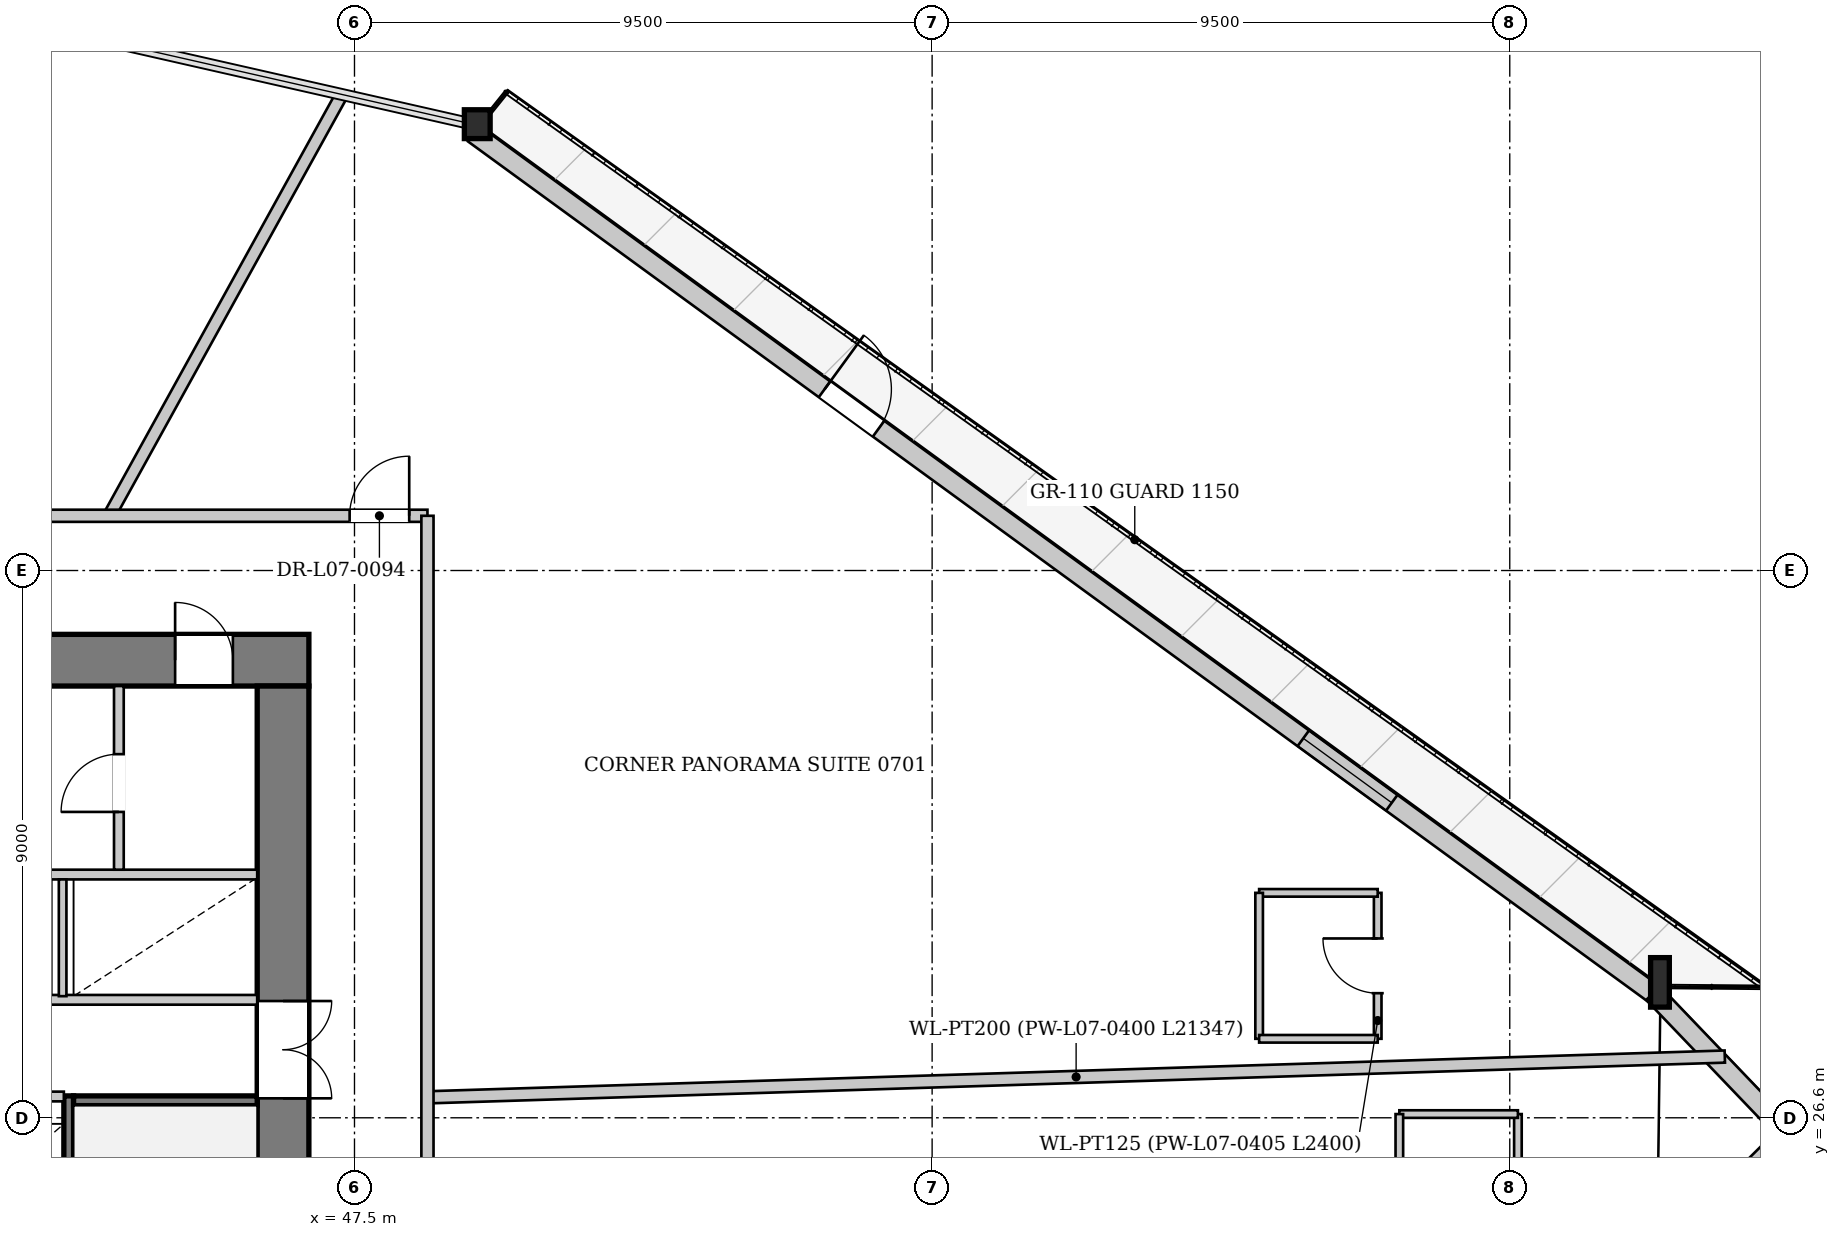
"""IFC4 building model, lengths in metres.
Left out: names, types, materials, properties, quantities, classifications, styles, units other than length and angle.
Written with IfcOpenShell. Run it as: python <this file> out.ifc"""

import sys

from ifc_helpers import new_model, si_unit, direction, frame, frame_2d, origin, origin_2d, place, context, subcontext, project, spatial, rectangle, i_section, extrude, source, transform, mapped, element, fill, save


model = new_model("IFC4")
c1 = context("Model", 3, precision=1e-05, world=origin(), true_north=direction((0.0, 1.0)))
c2 = subcontext(c1, "Body", "Model", "MODEL_VIEW")
j1 = project(units=[si_unit("LENGTHUNIT", "METRE"), si_unit("PLANEANGLEUNIT", "RADIAN")], contexts=[c1])
p1 = place(None, origin())
s1 = spatial("IfcSite", under=j1, at=p1, CompositionType="ELEMENT")
p2 = place(p1, origin())
s2 = spatial("IfcBuilding", under=s1, at=p2, CompositionType="ELEMENT")
p3 = place(p2, frame((0.0, 0.0, 32.85)))
s3 = spatial("IfcBuildingStorey", under=s2, at=p3, CompositionType="ELEMENT", Elevation=32.85)
m1 = source(origin(), c2, "Body", "SweptSolid", [
    extrude(i_section(OverallWidth=0.308, OverallDepth=0.814, WebThickness=0.021, FlangeThickness=0.04, at=origin_2d()), origin(), (0.0, 0.0, 1.0), 3.388),
])
p4 = place(p3, frame((68.975, 28.759, 0.0), z_axis=(-0.00288265822, 0.039852749888, 0.999201405427), x_axis=(-0.99739420877, -0.072144246566, 0.0)))
e1 = element("IfcColumn", 1, at=p4, inside=s3, PredefinedType="COLUMN", context=c2, shape_type="MappedRepresentation", body=[
    mapped(m1, transform((0.0, 0.0, 0.0), x_axis=(1.0, 0.0, 0.0), y_axis=(0.0, 1.0, 0.0), z_axis=(0.0, 0.0, 1.0), scale=1.0)),
])
m2 = source(origin(), c2, "Body", "SweptSolid", [
    extrude(i_section(OverallWidth=0.424, OverallDepth=0.474, WebThickness=0.043, FlangeThickness=0.068, at=origin_2d()), origin(), (0.0, 0.0, 1.0), 3.386),
])
p5 = place(p3, frame((49.555, 42.915, 0.0), z_axis=(-0.021053232125, 0.014852622664, 0.999668025405), x_axis=(-0.576463443595, -0.817122939464, 0.0)))
e2 = element("IfcColumn", 2, at=p5, inside=s3, PredefinedType="COLUMN", context=c2, shape_type="MappedRepresentation", body=[
    mapped(m2, transform((0.0, 0.0, 0.0), x_axis=(1.0, 0.0, 0.0), y_axis=(0.0, 1.0, 0.0), z_axis=(0.0, 0.0, 1.0), scale=1.0)),
])
p6 = place(p3, frame((49.46, 42.786, 0.0), z_axis=(0.0, 0.0, 1.0), x_axis=(0.808105654282, -0.589037563757, 0.0)))
e3 = element("IfcWall", 3, at=p6, inside=s3, PredefinedType="SOLIDWALL", context=c2, shape_type="SweptSolid", body=[
    extrude(rectangle(XDim=24.032, YDim=0.32, at=frame_2d((12.016, 0.0))), origin(), (0.0, 0.0, 1.0), 2.592),
])
p7 = place(p6, frame((7.14, 0.0, 0.0)))
e4 = element("IfcOpeningElement", 4, at=p7, cuts=e3, PredefinedType="OPENING", context=c2, shape_type="SweptSolid", body=[
    extrude(rectangle(XDim=1.1, YDim=2.3, at=frame_2d((0.55, 1.15))), frame((0.0, 0.17, 0.0), z_axis=(0.0, -1.0, 0.0), x_axis=(1.0, 0.0, 0.0)), (0.0, 0.0, 1.0), 0.34),
])
p8 = place(p6, frame((16.884, 0.0, 0.272)))
e5 = element("IfcOpeningElement", 5, at=p8, cuts=e3, PredefinedType="OPENING", context=c2, shape_type="SweptSolid", body=[
    extrude(rectangle(XDim=1.8, YDim=2.2, at=frame_2d((0.9, 1.1))), frame((0.0, 0.17, 0.0), z_axis=(0.0, -1.0, 0.0), x_axis=(1.0, 0.0, 0.0)), (0.0, 0.0, 1.0), 0.34),
])
for number, where, z_axis, x_axis in (
    (6, (68.859, 28.649, 0.0), (0.0, 0.0, 1.0), (0.691, -0.722, 0.0)),
    (7, (71.181, 26.45, 0.0), (0.0, 0.0, 1.0), (-0.71, -0.704, 0.0)),
):
    element("IfcWall", number, at=place(p3, frame(where, z_axis=z_axis, x_axis=x_axis)), inside=s3, PredefinedType="SOLIDWALL", context=c2, shape_type="SweptSolid", body=[
        extrude(rectangle(XDim=3.354, YDim=0.32, at=frame_2d((1.677, 0.0))), origin(), (0.0, 0.0, 1.0), 2.592),
    ])
p9 = place(p3, frame((29.25, 34.125, 0.0), z_axis=(0.0, 0.0, 1.0), x_axis=(1.0, 0.0, 0.0)))
e8 = element("IfcWall", 8, at=p9, inside=s3, PredefinedType="SHEAR", context=c2, shape_type="SweptSolid", body=[
    extrude(rectangle(XDim=17.5, YDim=0.85, at=frame_2d((8.75, 0.0))), origin(), (0.0, 0.0, 1.0), 3.3),
])
p10 = place(p9, frame((1.85, 0.0, 0.0)))
e9 = element("IfcOpeningElement", 9, at=p10, cuts=e8, PredefinedType="OPENING", context=c2, shape_type="SweptSolid", body=[
    extrude(rectangle(XDim=0.95, YDim=2.1, at=frame_2d((0.475, 1.05))), frame((0.0, 0.435, 0.0), z_axis=(0.0, -1.0, 0.0), x_axis=(1.0, 0.0, 0.0)), (0.0, 0.0, 1.0), 0.87),
])
p11 = place(p9, frame((4.23, 0.0, 0.0)))
e10 = element("IfcOpeningElement", 10, at=p11, cuts=e8, PredefinedType="OPENING", context=c2, shape_type="SweptSolid", body=[
    extrude(rectangle(XDim=1.32, YDim=2.2, at=frame_2d((0.66, 1.1))), frame((0.0, 0.435, 0.0), z_axis=(0.0, -1.0, 0.0), x_axis=(1.0, 0.0, 0.0)), (0.0, 0.0, 1.0), 0.87),
])
p12 = place(p9, frame((15.3, 0.0, 0.0)))
e11 = element("IfcOpeningElement", 11, at=p12, cuts=e8, PredefinedType="OPENING", context=c2, shape_type="SweptSolid", body=[
    extrude(rectangle(XDim=0.95, YDim=2.1, at=frame_2d((0.475, 1.05))), frame((0.0, 0.435, 0.0), z_axis=(0.0, -1.0, 0.0), x_axis=(1.0, 0.0, 0.0)), (0.0, 0.0, 1.0), 0.87),
])
p13 = place(p3, frame((46.325, 33.7, 0.0), z_axis=(0.0, 0.0, 1.0), x_axis=(0.0, -1.0, 0.0)))
e12 = element("IfcWall", 12, at=p13, inside=s3, PredefinedType="SHEAR", context=c2, shape_type="SweptSolid", body=[
    extrude(rectangle(XDim=14.2, YDim=0.85, at=frame_2d((7.1, 0.0))), origin(), (0.0, 0.0, 1.0), 3.3),
])
p14 = place(p13, frame((5.18, 0.0, 0.0)))
e13 = element("IfcOpeningElement", 13, at=p14, cuts=e12, PredefinedType="OPENING", context=c2, shape_type="SweptSolid", body=[
    extrude(rectangle(XDim=1.6, YDim=2.2, at=frame_2d((0.8, 1.1))), frame((0.0, 0.435, 0.0), z_axis=(0.0, -1.0, 0.0), x_axis=(1.0, 0.0, 0.0)), (0.0, 0.0, 1.0), 0.87),
])
p15 = place(p3, frame((42.8, 26.96, 0.0), z_axis=(0.0, 0.0, 1.0), x_axis=(0.0, -1.0, 0.0)))
e14 = element("IfcWall", 14, at=p15, inside=s3, PredefinedType="PARTITIONING", context=c2, shape_type="SweptSolid", body=[
    extrude(rectangle(XDim=7.46, YDim=0.16, at=frame_2d((3.73, 0.0))), origin(), (0.0, 0.0, 1.0), 3.3),
])
p16 = place(p15, frame((6.06, 0.0, 0.0)))
e15 = element("IfcOpeningElement", 15, at=p16, cuts=e14, PredefinedType="OPENING", context=c2, shape_type="SweptSolid", body=[
    extrude(rectangle(XDim=1.32, YDim=2.2, at=frame_2d((0.66, 1.1))), frame((0.0, 0.09, 0.0), z_axis=(0.0, -1.0, 0.0), x_axis=(1.0, 0.0, 0.0)), (0.0, 0.0, 1.0), 0.18),
])
p17 = place(p3, frame((42.88, 26.88, 0.0), z_axis=(0.0, 0.0, 1.0), x_axis=(1.0, 0.0, 0.0)))
e16 = element("IfcWall", 16, at=p17, inside=s3, PredefinedType="PARTITIONING", context=c2, shape_type="SweptSolid", body=[
    extrude(rectangle(XDim=3.02, YDim=0.16, at=frame_2d((1.51, 0.0))), origin(), (0.0, 0.0, 1.0), 3.3),
])
p18 = place(p3, frame((33.28, 26.95, 0.0), z_axis=(0.0, 0.0, 1.0), x_axis=(1.0, 0.0, 0.0)))
e17 = element("IfcWall", 17, at=p18, inside=s3, PredefinedType="PARTITIONING", context=c2, shape_type="SweptSolid", body=[
    extrude(rectangle(XDim=9.44, YDim=0.16, at=frame_2d((4.72, 0.0))), origin(), (0.0, 0.0, 1.0), 3.3),
])
p19 = place(p18, frame((0.26, 0.0, 0.0)))
e18 = element("IfcOpeningElement", 18, at=p19, cuts=e17, PredefinedType="OPENING", context=c2, shape_type="SweptSolid", body=[
    extrude(rectangle(XDim=1.1, YDim=2.2, at=frame_2d((0.55, 1.1))), frame((0.0, 0.09, 0.0), z_axis=(0.0, -1.0, 0.0), x_axis=(1.0, 0.0, 0.0)), (0.0, 0.0, 1.0), 0.18),
])
p20 = place(p18, frame((2.01, 0.0, 0.0)))
e19 = element("IfcOpeningElement", 19, at=p20, cuts=e17, PredefinedType="OPENING", context=c2, shape_type="SweptSolid", body=[
    extrude(rectangle(XDim=1.1, YDim=2.2, at=frame_2d((0.55, 1.1))), frame((0.0, 0.09, 0.0), z_axis=(0.0, -1.0, 0.0), x_axis=(1.0, 0.0, 0.0)), (0.0, 0.0, 1.0), 0.18),
])
p21 = place(p18, frame((3.76, 0.0, 0.0)))
e20 = element("IfcOpeningElement", 20, at=p21, cuts=e17, PredefinedType="OPENING", context=c2, shape_type="SweptSolid", body=[
    extrude(rectangle(XDim=1.1, YDim=2.2, at=frame_2d((0.55, 1.1))), frame((0.0, 0.09, 0.0), z_axis=(0.0, -1.0, 0.0), x_axis=(1.0, 0.0, 0.0)), (0.0, 0.0, 1.0), 0.18),
])
p22 = place(p18, frame((5.51, 0.0, 0.0)))
e21 = element("IfcOpeningElement", 21, at=p22, cuts=e17, PredefinedType="OPENING", context=c2, shape_type="SweptSolid", body=[
    extrude(rectangle(XDim=1.1, YDim=2.2, at=frame_2d((0.55, 1.1))), frame((0.0, 0.09, 0.0), z_axis=(0.0, -1.0, 0.0), x_axis=(1.0, 0.0, 0.0)), (0.0, 0.0, 1.0), 0.18),
])
p23 = place(p3, frame((33.28, 28.54, 0.0), z_axis=(0.0, 0.0, 1.0), x_axis=(1.0, 0.0, 0.0)))
e22 = element("IfcWall", 22, at=p23, inside=s3, PredefinedType="PARTITIONING", context=c2, shape_type="SweptSolid", body=[
    extrude(rectangle(XDim=12.62, YDim=0.16, at=frame_2d((6.31, 0.0))), origin(), (0.0, 0.0, 1.0), 3.3),
])
p24 = place(p3, frame((40.72, 30.6, 0.0), z_axis=(0.0, 0.0, 1.0), x_axis=(1.0, 0.0, 0.0)))
e23 = element("IfcWall", 23, at=p24, inside=s3, PredefinedType="PARTITIONING", context=c2, shape_type="SweptSolid", body=[
    extrude(rectangle(XDim=5.18, YDim=0.16, at=frame_2d((2.59, 0.0))), origin(), (0.0, 0.0, 1.0), 3.3),
])
p25 = place(p3, frame((42.7, 28.6, 0.0), z_axis=(0.0, 0.0, 1.0), x_axis=(0.0, 1.0, 0.0)))
e24 = element("IfcWall", 24, at=p25, inside=s3, PredefinedType="PARTITIONING", context=c2, shape_type="SweptSolid", body=[
    extrude(rectangle(XDim=1.92, YDim=0.125, at=frame_2d((0.96, 0.0))), origin(), (0.0, 0.0, 1.0), 3.3),
])
p26 = place(p3, frame((43.625, 30.68, 0.0), z_axis=(0.0, 0.0, 1.0), x_axis=(0.0, 1.0, 0.0)))
e25 = element("IfcWall", 25, at=p26, inside=s3, PredefinedType="PARTITIONING", context=c2, shape_type="SweptSolid", body=[
    extrude(rectangle(XDim=3.02, YDim=0.16, at=frame_2d((1.51, 0.0))), origin(), (0.0, 0.0, 1.0), 3.3),
])
p27 = place(p26, frame((0.95, 0.0, 0.0)))
e26 = element("IfcOpeningElement", 26, at=p27, cuts=e25, PredefinedType="OPENING", context=c2, shape_type="SweptSolid", body=[
    extrude(rectangle(XDim=0.95, YDim=2.1, at=frame_2d((0.475, 1.05))), frame((0.0, 0.09, 0.0), z_axis=(0.0, -1.0, 0.0), x_axis=(1.0, 0.0, 0.0)), (0.0, 0.0, 1.0), 0.18),
])
p28 = place(p3, frame((48.7, 26.936, 0.0), z_axis=(0.0, 0.0, 1.0), x_axis=(0.999506728067, 0.031405422286, 0.0)))
e27 = element("IfcWall", 27, at=p28, inside=s3, PredefinedType="PARTITIONING", context=c2, shape_type="SweptSolid", body=[
    extrude(rectangle(XDim=21.347, YDim=0.2, at=frame_2d((10.673, 0.0))), origin(), (0.0, 0.0, 1.0), 3.3),
])
p29 = place(p3, frame((43.466, 36.5, 0.0), z_axis=(0.0, 0.0, 1.0), x_axis=(0.483393303681, 0.875403286467, 0.0)))
e28 = element("IfcWall", 28, at=p29, inside=s3, PredefinedType="PARTITIONING", context=c2, shape_type="SweptSolid", body=[
    extrude(rectangle(XDim=7.884, YDim=0.2, at=frame_2d((3.942, 0.0))), origin(), (0.0, 0.0, 1.0), 3.3),
])
p30 = place(p3, frame((64.328, 27.899, 0.0), z_axis=(0.0, 0.0, 1.0), x_axis=(0.0, 1.0, 0.0)))
e29 = element("IfcWall", 29, at=p30, inside=s3, PredefinedType="PARTITIONING", context=c2, shape_type="SweptSolid", body=[
    extrude(rectangle(XDim=2.4, YDim=0.125, at=frame_2d((1.2, 0.0))), origin(), (0.0, 0.0, 1.0), 3.3),
])
p31 = place(p30, frame((0.75, 0.0, 0.0)))
e30 = element("IfcOpeningElement", 30, at=p31, cuts=e29, PredefinedType="OPENING", context=c2, shape_type="SweptSolid", body=[
    extrude(rectangle(XDim=0.9, YDim=2.1, at=frame_2d((0.45, 1.05))), frame((0.0, 0.073, 0.0), z_axis=(0.0, -1.0, 0.0), x_axis=(1.0, 0.0, 0.0)), (0.0, 0.0, 1.0), 0.145),
])
p32 = place(p3, frame((64.328, 30.299, 0.0), z_axis=(0.0, 0.0, 1.0), x_axis=(-1.0, 0.0, 0.0)))
e31 = element("IfcWall", 31, at=p32, inside=s3, PredefinedType="PARTITIONING", context=c2, shape_type="SweptSolid", body=[
    extrude(rectangle(XDim=1.95, YDim=0.125, at=frame_2d((0.975, 0.0))), origin(), (0.0, 0.0, 1.0), 3.3),
])
p33 = place(p3, frame((62.378, 30.299, 0.0), z_axis=(0.0, 0.0, 1.0), x_axis=(0.0, -1.0, 0.0)))
e32 = element("IfcWall", 32, at=p33, inside=s3, PredefinedType="PARTITIONING", context=c2, shape_type="SweptSolid", body=[
    extrude(rectangle(XDim=2.4, YDim=0.125, at=frame_2d((1.2, 0.0))), origin(), (0.0, 0.0, 1.0), 3.3),
])
p34 = place(p3, frame((62.378, 27.899, 0.0), z_axis=(0.0, 0.0, 1.0), x_axis=(1.0, 0.0, 0.0)))
e33 = element("IfcWall", 33, at=p34, inside=s3, PredefinedType="PARTITIONING", context=c2, shape_type="SweptSolid", body=[
    extrude(rectangle(XDim=1.95, YDim=0.125, at=frame_2d((0.975, 0.0))), origin(), (0.0, 0.0, 1.0), 3.3),
])
p35 = place(p3, frame((66.634, 24.261, 0.0), z_axis=(0.0, 0.0, 1.0), x_axis=(0.0, 1.0, 0.0)))
e34 = element("IfcWall", 34, at=p35, inside=s3, PredefinedType="PARTITIONING", context=c2, shape_type="SweptSolid", body=[
    extrude(rectangle(XDim=2.4, YDim=0.125, at=frame_2d((1.2, 0.0))), origin(), (0.0, 0.0, 1.0), 3.3),
])
p36 = place(p35, frame((0.75, 0.0, 0.0)))
e35 = element("IfcOpeningElement", 35, at=p36, cuts=e34, PredefinedType="OPENING", context=c2, shape_type="SweptSolid", body=[
    extrude(rectangle(XDim=0.9, YDim=2.1, at=frame_2d((0.45, 1.05))), frame((0.0, 0.073, 0.0), z_axis=(0.0, -1.0, 0.0), x_axis=(1.0, 0.0, 0.0)), (0.0, 0.0, 1.0), 0.145),
])
p37 = place(p3, frame((66.634, 26.661, 0.0), z_axis=(0.0, 0.0, 1.0), x_axis=(-1.0, 0.0, 0.0)))
e36 = element("IfcWall", 36, at=p37, inside=s3, PredefinedType="PARTITIONING", context=c2, shape_type="SweptSolid", body=[
    extrude(rectangle(XDim=1.95, YDim=0.125, at=frame_2d((0.975, 0.0))), origin(), (0.0, 0.0, 1.0), 2.795),
])
p38 = place(p3, frame((64.684, 26.661, 0.0), z_axis=(0.0, 0.0, 1.0), x_axis=(0.0, -1.0, 0.0)))
e37 = element("IfcWall", 37, at=p38, inside=s3, PredefinedType="PARTITIONING", context=c2, shape_type="SweptSolid", body=[
    extrude(rectangle(XDim=2.4, YDim=0.125, at=frame_2d((1.2, 0.0))), origin(), (0.0, 0.0, 1.0), 3.3),
])
p39 = place(p3, frame((27.3, 36.5, 0.0), z_axis=(0.0, 0.0, 1.0), x_axis=(1.0, 0.0, 0.0)))
e38 = element("IfcWall", 38, at=p39, inside=s3, PredefinedType="PARTITIONING", context=c2, shape_type="SweptSolid", body=[
    extrude(rectangle(XDim=21.4, YDim=0.2, at=frame_2d((10.7, 0.0))), origin(), (0.0, 0.0, 1.0), 3.3),
])
p40 = place(p39, frame((20.12, 0.0, 0.0)))
e39 = element("IfcOpeningElement", 39, at=p40, cuts=e38, PredefinedType="OPENING", context=c2, shape_type="SweptSolid", body=[
    extrude(rectangle(XDim=0.98, YDim=2.15, at=frame_2d((0.49, 1.075))), frame((0.0, 0.11, 0.0), z_axis=(0.0, -1.0, 0.0), x_axis=(1.0, 0.0, 0.0)), (0.0, 0.0, 1.0), 0.22),
])
p41 = place(p3, frame((48.7, 16.7, 0.0), z_axis=(0.0, 0.0, 1.0), x_axis=(0.0, 1.0, 0.0)))
e40 = element("IfcWall", 40, at=p41, inside=s3, PredefinedType="PARTITIONING", context=c2, shape_type="SweptSolid", body=[
    extrude(rectangle(XDim=19.8, YDim=0.2, at=frame_2d((9.9, 0.0))), origin(), (0.0, 0.0, 1.0), 3.3),
])
p42 = place(p41, frame((4.231, 0.0, 0.0)))
e41 = element("IfcOpeningElement", 41, at=p42, cuts=e40, PredefinedType="OPENING", context=c2, shape_type="SweptSolid", body=[
    extrude(rectangle(XDim=0.98, YDim=2.15, at=frame_2d((0.49, 1.075))), frame((0.0, 0.11, 0.0), z_axis=(0.0, -1.0, 0.0), x_axis=(1.0, 0.0, 0.0)), (0.0, 0.0, 1.0), 0.22),
])
m3 = source(origin(), c2, "Body", "SweptSolid", [
    extrude(rectangle(XDim=1.1, YDim=2.3, at=frame_2d((0.55, 1.15))), frame((0.0, 0.025, 0.0), z_axis=(0.0, -1.0, 0.0), x_axis=(1.0, 0.0, 0.0)), (0.0, 0.0, 1.0), 0.05),
])
p43 = place(p7, origin())
e42 = element("IfcDoor", 42, at=p43, inside=s3, OperationType="SINGLE_SWING_LEFT", PredefinedType="DOOR", context=c2, shape_type="MappedRepresentation", body=[
    mapped(m3, transform((0.0, 0.0, 0.0), x_axis=(1.0, 0.0, 0.0), y_axis=(0.0, 1.0, 0.0), z_axis=(0.0, 0.0, 1.0), scale=1.0)),
])
fill(e4, e42)
m4 = source(origin(), c2, "Body", "SweptSolid", [
    extrude(rectangle(XDim=1.8, YDim=2.2, at=frame_2d((0.9, 1.1))), frame((0.0, 0.03, 0.0), z_axis=(0.0, -1.0, 0.0), x_axis=(1.0, 0.0, 0.0)), (0.0, 0.0, 1.0), 0.06),
])
p44 = place(p8, origin())
e43 = element("IfcWindow", 43, at=p44, inside=s3, PartitioningType="SINGLE_PANEL", PredefinedType="WINDOW", context=c2, shape_type="MappedRepresentation", body=[
    mapped(m4, transform((0.0, 0.0, 0.0), x_axis=(1.0, 0.0, 0.0), y_axis=(0.0, 1.0, 0.0), z_axis=(0.0, 0.0, 1.0), scale=1.0)),
])
fill(e5, e43)
m5 = source(origin(), c2, "Body", "SweptSolid", [
    extrude(rectangle(XDim=1.6, YDim=2.2, at=frame_2d((0.8, 1.1))), frame((0.0, 0.025, 0.0), z_axis=(0.0, -1.0, 0.0), x_axis=(1.0, 0.0, 0.0)), (0.0, 0.0, 1.0), 0.05),
])
p45 = place(p14, origin())
e44 = element("IfcDoor", 44, at=p45, inside=s3, OperationType="DOUBLE_DOOR_SINGLE_SWING", PredefinedType="DOOR", context=c2, shape_type="MappedRepresentation", body=[
    mapped(m5, transform((0.0, 0.0, 0.0), x_axis=(1.0, 0.0, 0.0), y_axis=(0.0, 1.0, 0.0), z_axis=(0.0, 0.0, 1.0), scale=1.0)),
])
fill(e13, e44)
m6 = source(origin(), c2, "Body", "SweptSolid", [
    extrude(rectangle(XDim=0.95, YDim=2.1, at=frame_2d((0.475, 1.05))), frame((0.0, 0.025, 0.0), z_axis=(0.0, -1.0, 0.0), x_axis=(1.0, 0.0, 0.0)), (0.0, 0.0, 1.0), 0.05),
])
p46 = place(p27, origin())
e45 = element("IfcDoor", 45, at=p46, inside=s3, OperationType="SINGLE_SWING_LEFT", PredefinedType="DOOR", context=c2, shape_type="MappedRepresentation", body=[
    mapped(m6, transform((0.0, 0.0, 0.0), x_axis=(1.0, 0.0, 0.0), y_axis=(0.0, 1.0, 0.0), z_axis=(0.0, 0.0, 1.0), scale=1.0)),
])
fill(e26, e45)
p47 = place(p12, origin())
e46 = element("IfcDoor", 46, at=p47, inside=s3, OperationType="SINGLE_SWING_LEFT", PredefinedType="DOOR", context=c2, shape_type="MappedRepresentation", body=[
    mapped(m6, transform((0.0, 0.0, 0.0), x_axis=(1.0, 0.0, 0.0), y_axis=(0.0, 1.0, 0.0), z_axis=(0.0, 0.0, 1.0), scale=1.0)),
])
fill(e11, e46)
m7 = source(origin(), c2, "Body", "SweptSolid", [
    extrude(rectangle(XDim=0.9, YDim=2.1, at=frame_2d((0.45, 1.05))), frame((0.0, 0.025, 0.0), z_axis=(0.0, -1.0, 0.0), x_axis=(1.0, 0.0, 0.0)), (0.0, 0.0, 1.0), 0.05),
])
p48 = place(p31, origin())
e47 = element("IfcDoor", 47, at=p48, inside=s3, OperationType="SINGLE_SWING_RIGHT", PredefinedType="DOOR", context=c2, shape_type="MappedRepresentation", body=[
    mapped(m7, transform((0.0, 0.0, 0.0), x_axis=(1.0, 0.0, 0.0), y_axis=(0.0, 1.0, 0.0), z_axis=(0.0, 0.0, 1.0), scale=1.0)),
])
fill(e30, e47)
m8 = source(origin(), c2, "Body", "SweptSolid", [
    extrude(rectangle(XDim=0.98, YDim=2.15, at=frame_2d((0.49, 1.075))), frame((0.0, 0.025, 0.0), z_axis=(0.0, -1.0, 0.0), x_axis=(1.0, 0.0, 0.0)), (0.0, 0.0, 1.0), 0.05),
])
p49 = place(p40, origin())
e48 = element("IfcDoor", 48, at=p49, inside=s3, OperationType="SINGLE_SWING_RIGHT", PredefinedType="DOOR", context=c2, shape_type="MappedRepresentation", body=[
    mapped(m8, transform((0.0, 0.0, 0.0), x_axis=(1.0, 0.0, 0.0), y_axis=(0.0, 1.0, 0.0), z_axis=(0.0, 0.0, 1.0), scale=1.0)),
])
fill(e39, e48)
save(model, sys.argv[1])
